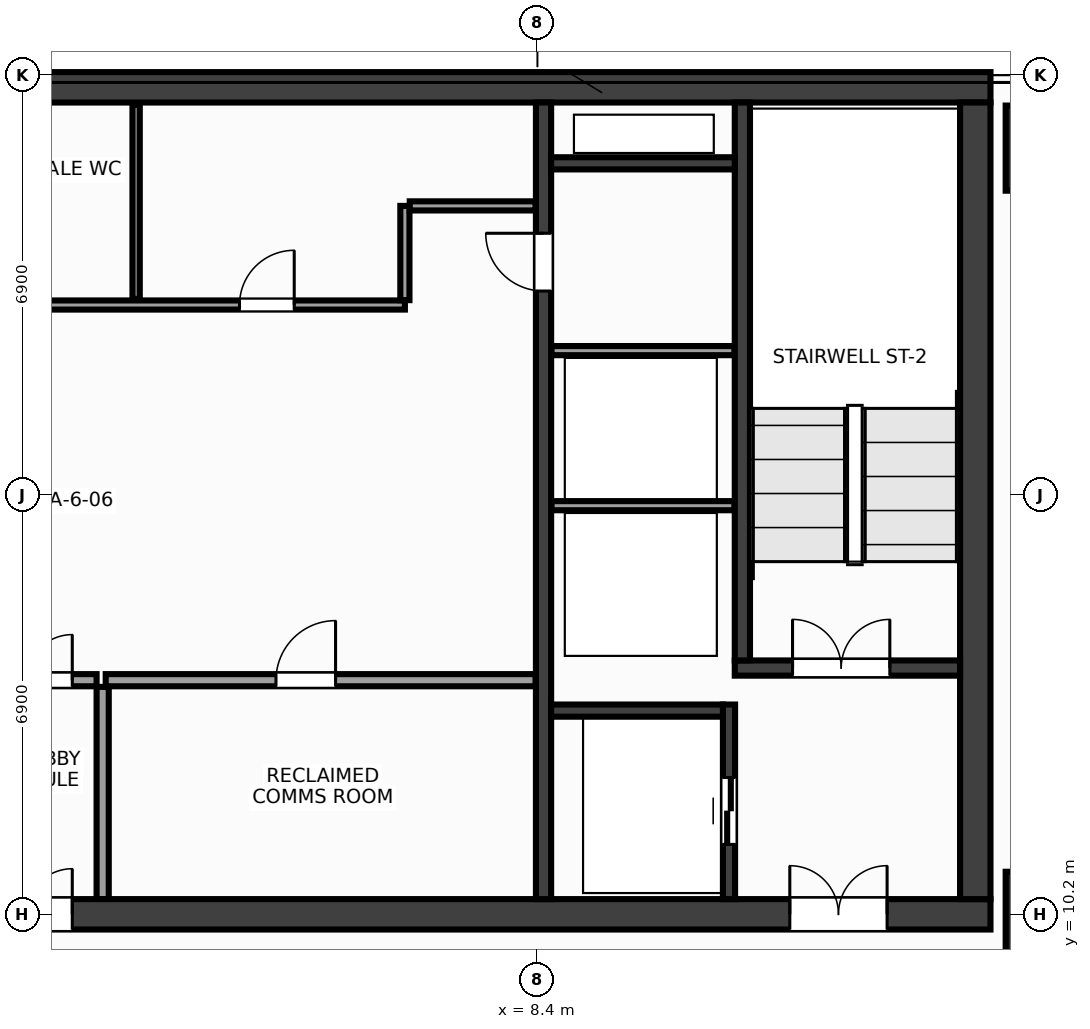
"""IFC4 building model, lengths in metres.
Left out: names, types, materials, properties, quantities, classifications, styles, units other than length and angle.
Written with IfcOpenShell. Run it as: python <this file> out.ifc"""

import sys

from ifc_helpers import new_model, si_unit, direction, frame, frame_2d, origin, origin_2d, place, context, subcontext, project, spatial, rectangle, extrude, source, transform, mapped, element, fill, save


model = new_model("IFC4")
c1 = context("Model", 3, precision=1e-05, world=origin(), true_north=direction((0.0, 1.0)))
c2 = subcontext(c1, "Body", "Model", "MODEL_VIEW")
j1 = project(units=[si_unit("LENGTHUNIT", "METRE"), si_unit("PLANEANGLEUNIT", "RADIAN")], contexts=[c1])
p1 = place(None, origin())
s1 = spatial("IfcSite", under=j1, at=p1, CompositionType="ELEMENT")
p2 = place(p1, origin())
s2 = spatial("IfcBuilding", under=s1, at=p2, CompositionType="ELEMENT")
p3 = place(p2, frame((0.0, 0.0, 207.2)))
s3 = spatial("IfcBuildingStorey", under=s2, at=p3, CompositionType="ELEMENT", Elevation=207.2)
m1 = source(origin(), c2, "Body", "SweptSolid", [
    extrude(rectangle(XDim=31.7, YDim=0.5, at=frame_2d((15.85, 0.0))), origin(), (0.0, 0.0, 1.0), 3.6),
])
p4 = place(p3, frame((-15.85, 23.8, 0.0), z_axis=(0.0, 0.0, 1.0), x_axis=(1.0, 0.0, 0.0)))
e1 = element("IfcWall", 1, at=p4, inside=s3, PredefinedType="SHEAR", context=c2, shape_type="MappedRepresentation", body=[
    mapped(m1, transform((0.0, 0.0, 0.0), x_axis=(1.0, 0.0, 0.0), y_axis=(0.0, 1.0, 0.0), z_axis=(0.0, 0.0, 1.0), scale=1.0)),
])
p5 = place(p3, frame((-15.85, 10.2, 0.0), z_axis=(0.0, 0.0, 1.0), x_axis=(1.0, 0.0, 0.0)))
e2 = element("IfcWall", 2, at=p5, inside=s3, PredefinedType="SHEAR", context=c2, shape_type="MappedRepresentation", body=[
    mapped(m1, transform((0.0, 0.0, 0.0), x_axis=(1.0, 0.0, 0.0), y_axis=(0.0, 1.0, 0.0), z_axis=(0.0, 0.0, 1.0), scale=1.0)),
])
p6 = place(p5, frame((1.7, 0.0, 0.0)))
e3 = element("IfcOpeningElement", 3, at=p6, cuts=e2, PredefinedType="OPENING", context=c2, shape_type="SweptSolid", body=[
    extrude(rectangle(XDim=1.6, YDim=2.15, at=frame_2d((0.8, 1.075))), frame((0.0, 0.262, 0.0), z_axis=(0.0, -1.0, 0.0), x_axis=(1.0, 0.0, 0.0)), (0.0, 0.0, 1.0), 0.524),
])
p7 = place(p5, frame((28.4, 0.0, 0.0)))
e4 = element("IfcOpeningElement", 4, at=p7, cuts=e2, PredefinedType="OPENING", context=c2, shape_type="SweptSolid", body=[
    extrude(rectangle(XDim=1.6, YDim=2.15, at=frame_2d((0.8, 1.075))), frame((0.0, 0.262, 0.0), z_axis=(0.0, -1.0, 0.0), x_axis=(1.0, 0.0, 0.0)), (0.0, 0.0, 1.0), 0.524),
])
p8 = place(p5, frame((15.1, 0.0, 0.0)))
e5 = element("IfcOpeningElement", 5, at=p8, cuts=e2, PredefinedType="OPENING", context=c2, shape_type="SweptSolid", body=[
    extrude(rectangle(XDim=1.5, YDim=2.2, at=frame_2d((0.75, 1.1))), frame((0.0, 0.262, 0.0), z_axis=(0.0, -1.0, 0.0), x_axis=(1.0, 0.0, 0.0)), (0.0, 0.0, 1.0), 0.524),
])
m2 = source(origin(), c2, "Body", "SweptSolid", [
    extrude(rectangle(XDim=13.1, YDim=0.5, at=frame_2d((6.55, 0.0))), origin(), (0.0, 0.0, 1.0), 3.6),
])
p9 = place(p3, frame((15.6, 10.45, 0.0), z_axis=(0.0, 0.0, 1.0), x_axis=(0.0, 1.0, 0.0)))
e6 = element("IfcWall", 6, at=p9, inside=s3, PredefinedType="SHEAR", context=c2, shape_type="MappedRepresentation", body=[
    mapped(m2, transform((0.0, 0.0, 0.0), x_axis=(1.0, 0.0, 0.0), y_axis=(0.0, 1.0, 0.0), z_axis=(0.0, 0.0, 1.0), scale=1.0)),
])
m3 = source(origin(), c2, "Body", "SweptSolid", [
    extrude(rectangle(XDim=13.1, YDim=0.25, at=frame_2d((6.55, 0.0))), origin(), (0.0, 0.0, 1.0), 3.6),
])
p10 = place(p3, frame((8.5, 10.45, 0.0), z_axis=(0.0, 0.0, 1.0), x_axis=(0.0, 1.0, 0.0)))
e7 = element("IfcWall", 7, at=p10, inside=s3, PredefinedType="SHEAR", context=c2, shape_type="MappedRepresentation", body=[
    mapped(m3, transform((0.0, 0.0, 0.0), x_axis=(1.0, 0.0, 0.0), y_axis=(0.0, 1.0, 0.0), z_axis=(0.0, 0.0, 1.0), scale=1.0)),
])
p11 = place(p10, frame((10.0, 0.0, 0.0)))
e8 = element("IfcOpeningElement", 8, at=p11, cuts=e7, PredefinedType="OPENING", context=c2, shape_type="SweptSolid", body=[
    extrude(rectangle(XDim=0.95, YDim=2.15, at=frame_2d((0.475, 1.075))), frame((0.0, 0.137, 0.0), z_axis=(0.0, -1.0, 0.0), x_axis=(1.0, 0.0, 0.0)), (0.0, 0.0, 1.0), 0.274),
])
m4 = source(origin(), c2, "Body", "SweptSolid", [
    extrude(rectangle(XDim=3.705, YDim=0.25, at=frame_2d((1.853, 0.0))), origin(), (0.0, 0.0, 1.0), 3.6),
])
p12 = place(p3, frame((11.645, 14.25, 0.0), z_axis=(0.0, 0.0, 1.0), x_axis=(1.0, 0.0, 0.0)))
e9 = element("IfcWall", 9, at=p12, inside=s3, PredefinedType="SHEAR", context=c2, shape_type="MappedRepresentation", body=[
    mapped(m4, transform((0.0, 0.0, 0.0), x_axis=(1.0, 0.0, 0.0), y_axis=(0.0, 1.0, 0.0), z_axis=(0.0, 0.0, 1.0), scale=1.0)),
])
p13 = place(p12, frame((0.95, 0.0, 0.0)))
e10 = element("IfcOpeningElement", 10, at=p13, cuts=e9, PredefinedType="OPENING", context=c2, shape_type="SweptSolid", body=[
    extrude(rectangle(XDim=1.6, YDim=2.15, at=frame_2d((0.8, 1.075))), frame((0.0, 0.137, 0.0), z_axis=(0.0, -1.0, 0.0), x_axis=(1.0, 0.0, 0.0)), (0.0, 0.0, 1.0), 0.274),
])
m5 = source(origin(), c2, "Body", "SweptSolid", [
    extrude(rectangle(XDim=9.175, YDim=0.25, at=frame_2d((4.587, 0.0))), origin(), (0.0, 0.0, 1.0), 3.6),
])
p14 = place(p3, frame((11.77, 14.375, 0.0), z_axis=(0.0, 0.0, 1.0), x_axis=(0.0, 1.0, 0.0)))
e11 = element("IfcWall", 11, at=p14, inside=s3, PredefinedType="SHEAR", context=c2, shape_type="MappedRepresentation", body=[
    mapped(m5, transform((0.0, 0.0, 0.0), x_axis=(1.0, 0.0, 0.0), y_axis=(0.0, 1.0, 0.0), z_axis=(0.0, 0.0, 1.0), scale=1.0)),
])
m6 = source(origin(), c2, "Body", "SweptSolid", [
    extrude(rectangle(XDim=3.2, YDim=0.2, at=frame_2d((1.6, 0.0))), origin(), (0.0, 0.0, 1.0), 3.6),
])
p15 = place(p3, frame((11.55, 10.45, 0.0), z_axis=(0.0, 0.0, 1.0), x_axis=(0.0, 1.0, 0.0)))
e12 = element("IfcWall", 12, at=p15, inside=s3, PredefinedType="SHEAR", context=c2, shape_type="MappedRepresentation", body=[
    mapped(m6, transform((0.0, 0.0, 0.0), x_axis=(1.0, 0.0, 0.0), y_axis=(0.0, 1.0, 0.0), z_axis=(0.0, 0.0, 1.0), scale=1.0)),
])
p16 = place(p15, frame((0.9, 0.0, 0.0)))
e13 = element("IfcOpeningElement", 13, at=p16, cuts=e12, PredefinedType="OPENING", context=c2, shape_type="SweptSolid", body=[
    extrude(rectangle(XDim=1.1, YDim=2.15, at=frame_2d((0.55, 1.075))), frame((0.0, 0.112, 0.0), z_axis=(0.0, -1.0, 0.0), x_axis=(1.0, 0.0, 0.0)), (0.0, 0.0, 1.0), 0.224),
])
m7 = source(origin(), c2, "Body", "SweptSolid", [
    extrude(rectangle(XDim=2.825, YDim=0.2, at=frame_2d((1.413, 0.0))), origin(), (0.0, 0.0, 1.0), 3.6),
])
p17 = place(p3, frame((8.625, 13.55, 0.0), z_axis=(0.0, 0.0, 1.0), x_axis=(1.0, 0.0, 0.0)))
e14 = element("IfcWall", 14, at=p17, inside=s3, PredefinedType="SHEAR", context=c2, shape_type="MappedRepresentation", body=[
    mapped(m7, transform((0.0, 0.0, 0.0), x_axis=(1.0, 0.0, 0.0), y_axis=(0.0, 1.0, 0.0), z_axis=(0.0, 0.0, 1.0), scale=1.0)),
])
m8 = source(origin(), c2, "Body", "SweptSolid", [
    extrude(rectangle(XDim=3.02, YDim=0.2, at=frame_2d((1.51, 0.0))), origin(), (0.0, 0.0, 1.0), 3.6),
])
p18 = place(p3, frame((8.625, 22.55, 0.0), z_axis=(0.0, 0.0, 1.0), x_axis=(1.0, 0.0, 0.0)))
e15 = element("IfcWall", 15, at=p18, inside=s3, PredefinedType="SHEAR", context=c2, shape_type="MappedRepresentation", body=[
    mapped(m8, transform((0.0, 0.0, 0.0), x_axis=(1.0, 0.0, 0.0), y_axis=(0.0, 1.0, 0.0), z_axis=(0.0, 0.0, 1.0), scale=1.0)),
])
m9 = source(origin(), c2, "Body", "SweptSolid", [
    extrude(rectangle(XDim=1.4, YDim=1.4, at=origin_2d()), origin(), (0.0, 0.0, 1.0), 3.6),
])
for number, where, z_axis, x_axis in (
    (16, (16.8, 10.2, 0.0), (0.0, 0.0, 1.0), (1.0, 0.0, 0.0)),
    (17, (16.8, 22.8, 0.0), (0.0, 0.0, 1.0), (1.0, 0.0, 0.0)),
):
    element("IfcColumn", number, at=place(p3, frame(where, z_axis=z_axis, x_axis=x_axis)), inside=s3, PredefinedType="COLUMN", context=c2, shape_type="MappedRepresentation", body=[
        mapped(m9, transform((0.0, 0.0, 0.0), x_axis=(1.0, 0.0, 0.0), y_axis=(0.0, 1.0, 0.0), z_axis=(0.0, 0.0, 1.0), scale=1.0)),
    ])
m10 = source(origin(), c2, "Body", "SweptSolid", [
    extrude(rectangle(XDim=3.01, YDim=0.15, at=frame_2d((1.505, 0.0))), origin(), (0.0, 0.0, 1.0), 3.38),
])
for number, where, z_axis, x_axis in (
    (18, (8.63, 16.92, 0.0), (0.0, 0.0, 1.0), (1.0, 0.0, 0.0)),
    (19, (8.63, 19.47, 0.0), (0.0, 0.0, 1.0), (1.0, 0.0, 0.0)),
):
    element("IfcWall", number, at=place(p3, frame(where, z_axis=z_axis, x_axis=x_axis)), inside=s3, PredefinedType="PARTITIONING", context=c2, shape_type="MappedRepresentation", body=[
        mapped(m10, transform((0.0, 0.0, 0.0), x_axis=(1.0, 0.0, 0.0), y_axis=(0.0, 1.0, 0.0), z_axis=(0.0, 0.0, 1.0), scale=1.0)),
    ])
m11 = source(origin(), c2, "Body", "SweptSolid", [
    extrude(rectangle(XDim=7.07, YDim=0.2, at=frame_2d((3.535, 0.0))), origin(), (0.0, 0.0, 1.0), 3.38),
])
p19 = place(p3, frame((1.3, 14.05, 0.0), z_axis=(0.0, 0.0, 1.0), x_axis=(1.0, 0.0, 0.0)))
e20 = element("IfcWall", 20, at=p19, inside=s3, PredefinedType="PARTITIONING", context=c2, shape_type="MappedRepresentation", body=[
    mapped(m11, transform((0.0, 0.0, 0.0), x_axis=(1.0, 0.0, 0.0), y_axis=(0.0, 1.0, 0.0), z_axis=(0.0, 0.0, 1.0), scale=1.0)),
])
p20 = place(p19, frame((2.8, 0.0, 0.0)))
e21 = element("IfcOpeningElement", 21, at=p20, cuts=e20, PredefinedType="OPENING", context=c2, shape_type="SweptSolid", body=[
    extrude(rectangle(XDim=0.98, YDim=2.15, at=frame_2d((0.49, 1.075))), frame((0.0, 0.112, 0.0), z_axis=(0.0, -1.0, 0.0), x_axis=(1.0, 0.0, 0.0)), (0.0, 0.0, 1.0), 0.224),
])
m12 = source(origin(), c2, "Body", "SweptSolid", [
    extrude(rectangle(XDim=3.49, YDim=0.2, at=frame_2d((1.745, 0.0))), origin(), (0.0, 0.0, 1.0), 3.38),
])
p21 = place(p3, frame((1.25, 10.45, 0.0), z_axis=(0.0, 0.0, 1.0), x_axis=(0.0, 1.0, 0.0)))
e22 = element("IfcWall", 22, at=p21, inside=s3, PredefinedType="PARTITIONING", context=c2, shape_type="MappedRepresentation", body=[
    mapped(m12, transform((0.0, 0.0, 0.0), x_axis=(1.0, 0.0, 0.0), y_axis=(0.0, 1.0, 0.0), z_axis=(0.0, 0.0, 1.0), scale=1.0)),
])
m13 = source(origin(), c2, "Body", "SweptSolid", [
    extrude(rectangle(XDim=2.3, YDim=0.2, at=frame_2d((1.15, 0.0))), origin(), (0.0, 0.0, 1.0), 3.38),
])
p22 = place(p3, frame((-1.15, 14.05, 0.0), z_axis=(0.0, 0.0, 1.0), x_axis=(1.0, 0.0, 0.0)))
e23 = element("IfcWall", 23, at=p22, inside=s3, PredefinedType="PARTITIONING", context=c2, shape_type="MappedRepresentation", body=[
    mapped(m13, transform((0.0, 0.0, 0.0), x_axis=(1.0, 0.0, 0.0), y_axis=(0.0, 1.0, 0.0), z_axis=(0.0, 0.0, 1.0), scale=1.0)),
])
p23 = place(p22, frame((0.4, 0.0, 0.0)))
e24 = element("IfcOpeningElement", 24, at=p23, cuts=e23, PredefinedType="OPENING", context=c2, shape_type="SweptSolid", body=[
    extrude(rectangle(XDim=1.5, YDim=2.2, at=frame_2d((0.75, 1.1))), frame((0.0, 0.112, 0.0), z_axis=(0.0, -1.0, 0.0), x_axis=(1.0, 0.0, 0.0)), (0.0, 0.0, 1.0), 0.224),
])
m14 = source(origin(), c2, "Body", "SweptSolid", [
    extrude(rectangle(XDim=14.59, YDim=0.15, at=frame_2d((7.295, 0.0))), origin(), (0.0, 0.0, 1.0), 3.38),
])
p24 = place(p3, frame((-8.37, 20.22, 0.0), z_axis=(0.0, 0.0, 1.0), x_axis=(1.0, 0.0, 0.0)))
e25 = element("IfcWall", 25, at=p24, inside=s3, PredefinedType="PARTITIONING", context=c2, shape_type="MappedRepresentation", body=[
    mapped(m14, transform((0.0, 0.0, 0.0), x_axis=(1.0, 0.0, 0.0), y_axis=(0.0, 1.0, 0.0), z_axis=(0.0, 0.0, 1.0), scale=1.0)),
])
p25 = place(p24, frame((1.06, 0.0, 0.0)))
e26 = element("IfcOpeningElement", 26, at=p25, cuts=e25, PredefinedType="OPENING", context=c2, shape_type="SweptSolid", body=[
    extrude(rectangle(XDim=0.9, YDim=2.15, at=frame_2d((0.45, 1.075))), frame((0.0, 0.087, 0.0), z_axis=(0.0, -1.0, 0.0), x_axis=(1.0, 0.0, 0.0)), (0.0, 0.0, 1.0), 0.174),
])
p26 = place(p24, frame((4.22, 0.0, 0.0)))
e27 = element("IfcOpeningElement", 27, at=p26, cuts=e25, PredefinedType="OPENING", context=c2, shape_type="SweptSolid", body=[
    extrude(rectangle(XDim=0.9, YDim=2.15, at=frame_2d((0.45, 1.075))), frame((0.0, 0.087, 0.0), z_axis=(0.0, -1.0, 0.0), x_axis=(1.0, 0.0, 0.0)), (0.0, 0.0, 1.0), 0.174),
])
p27 = place(p24, frame((7.82, 0.0, 0.0)))
e28 = element("IfcOpeningElement", 28, at=p27, cuts=e25, PredefinedType="OPENING", context=c2, shape_type="SweptSolid", body=[
    extrude(rectangle(XDim=0.9, YDim=2.15, at=frame_2d((0.45, 1.075))), frame((0.0, 0.087, 0.0), z_axis=(0.0, -1.0, 0.0), x_axis=(1.0, 0.0, 0.0)), (0.0, 0.0, 1.0), 0.174),
])
p28 = place(p24, frame((11.87, 0.0, 0.0)))
e29 = element("IfcOpeningElement", 29, at=p28, cuts=e25, PredefinedType="OPENING", context=c2, shape_type="SweptSolid", body=[
    extrude(rectangle(XDim=0.9, YDim=2.15, at=frame_2d((0.45, 1.075))), frame((0.0, 0.087, 0.0), z_axis=(0.0, -1.0, 0.0), x_axis=(1.0, 0.0, 0.0)), (0.0, 0.0, 1.0), 0.174),
])
m15 = source(origin(), c2, "Body", "SweptSolid", [
    extrude(rectangle(XDim=1.55, YDim=0.15, at=frame_2d((0.775, 0.0))), origin(), (0.0, 0.0, 1.0), 3.38),
])
p29 = place(p3, frame((6.22, 20.3, 0.0), z_axis=(0.0, 0.0, 1.0), x_axis=(0.0, 1.0, 0.0)))
e30 = element("IfcWall", 30, at=p29, inside=s3, PredefinedType="PARTITIONING", context=c2, shape_type="MappedRepresentation", body=[
    mapped(m15, transform((0.0, 0.0, 0.0), x_axis=(1.0, 0.0, 0.0), y_axis=(0.0, 1.0, 0.0), z_axis=(0.0, 0.0, 1.0), scale=1.0)),
])
m16 = source(origin(), c2, "Body", "SweptSolid", [
    extrude(rectangle(XDim=2.07, YDim=0.15, at=frame_2d((1.035, 0.0))), origin(), (0.0, 0.0, 1.0), 3.38),
])
p30 = place(p3, frame((6.3, 21.85, 0.0), z_axis=(0.0, 0.0, 1.0), x_axis=(1.0, 0.0, 0.0)))
e31 = element("IfcWall", 31, at=p30, inside=s3, PredefinedType="PARTITIONING", context=c2, shape_type="MappedRepresentation", body=[
    mapped(m16, transform((0.0, 0.0, 0.0), x_axis=(1.0, 0.0, 0.0), y_axis=(0.0, 1.0, 0.0), z_axis=(0.0, 0.0, 1.0), scale=1.0)),
])
m17 = source(origin(), c2, "Body", "SweptSolid", [
    extrude(rectangle(XDim=3.19, YDim=0.12, at=frame_2d((1.595, 0.0))), origin(), (0.0, 0.0, 1.0), 3.38),
])
p31 = place(p3, frame((1.8, 20.32, 0.0), z_axis=(0.0, 0.0, 1.0), x_axis=(0.0, 1.0, 0.0)))
e32 = element("IfcWall", 32, at=p31, inside=s3, PredefinedType="PARTITIONING", context=c2, shape_type="MappedRepresentation", body=[
    mapped(m17, transform((0.0, 0.0, 0.0), x_axis=(1.0, 0.0, 0.0), y_axis=(0.0, 1.0, 0.0), z_axis=(0.0, 0.0, 1.0), scale=1.0)),
])
m18 = source(origin(), c2, "Body", "SweptSolid", [
    extrude(rectangle(XDim=1.6, YDim=2.15, at=frame_2d((0.8, 1.075))), frame((0.0, 0.025, 0.0), z_axis=(0.0, -1.0, 0.0), x_axis=(1.0, 0.0, 0.0)), (0.0, 0.0, 1.0), 0.05),
])
p32 = place(p13, origin())
e33 = element("IfcDoor", 33, at=p32, inside=s3, OperationType="DOUBLE_DOOR_SINGLE_SWING", PredefinedType="DOOR", context=c2, shape_type="MappedRepresentation", body=[
    mapped(m18, transform((0.0, 0.0, 0.0), x_axis=(1.0, 0.0, 0.0), y_axis=(0.0, 1.0, 0.0), z_axis=(0.0, 0.0, 1.0), scale=1.0)),
])
fill(e10, e33)
p33 = place(p7, origin())
e34 = element("IfcDoor", 34, at=p33, inside=s3, OperationType="DOUBLE_DOOR_SINGLE_SWING", PredefinedType="DOOR", context=c2, shape_type="MappedRepresentation", body=[
    mapped(m18, transform((0.0, 0.0, 0.0), x_axis=(1.0, 0.0, 0.0), y_axis=(0.0, 1.0, 0.0), z_axis=(0.0, 0.0, 1.0), scale=1.0)),
])
fill(e4, e34)
m19 = source(origin(), c2, "Body", "SweptSolid", [
    extrude(rectangle(XDim=1.1, YDim=2.15, at=frame_2d((0.55, 1.075))), frame((0.0, 0.025, 0.0), z_axis=(0.0, -1.0, 0.0), x_axis=(1.0, 0.0, 0.0)), (0.0, 0.0, 1.0), 0.05),
])
p34 = place(p16, origin())
e35 = element("IfcDoor", 35, at=p34, inside=s3, OperationType="DOUBLE_DOOR_SLIDING", PredefinedType="DOOR", context=c2, shape_type="MappedRepresentation", body=[
    mapped(m19, transform((0.0, 0.0, 0.0), x_axis=(1.0, 0.0, 0.0), y_axis=(0.0, 1.0, 0.0), z_axis=(0.0, 0.0, 1.0), scale=1.0)),
])
fill(e13, e35)
m20 = source(origin(), c2, "Body", "SweptSolid", [
    extrude(rectangle(XDim=0.95, YDim=2.15, at=frame_2d((0.475, 1.075))), frame((0.0, 0.025, 0.0), z_axis=(0.0, -1.0, 0.0), x_axis=(1.0, 0.0, 0.0)), (0.0, 0.0, 1.0), 0.05),
])
p35 = place(p11, origin())
e36 = element("IfcDoor", 36, at=p35, inside=s3, OperationType="SINGLE_SWING_RIGHT", PredefinedType="DOOR", context=c2, shape_type="MappedRepresentation", body=[
    mapped(m20, transform((0.0, 0.0, 0.0), x_axis=(1.0, 0.0, 0.0), y_axis=(0.0, 1.0, 0.0), z_axis=(0.0, 0.0, 1.0), scale=1.0)),
])
fill(e8, e36)
m21 = source(origin(), c2, "Body", "SweptSolid", [
    extrude(rectangle(XDim=0.98, YDim=2.15, at=frame_2d((0.49, 1.075))), frame((0.0, 0.025, 0.0), z_axis=(0.0, -1.0, 0.0), x_axis=(1.0, 0.0, 0.0)), (0.0, 0.0, 1.0), 0.05),
])
p36 = place(p20, origin())
e37 = element("IfcDoor", 37, at=p36, inside=s3, OperationType="SINGLE_SWING_RIGHT", PredefinedType="DOOR", context=c2, shape_type="MappedRepresentation", body=[
    mapped(m21, transform((0.0, 0.0, 0.0), x_axis=(1.0, 0.0, 0.0), y_axis=(0.0, 1.0, 0.0), z_axis=(0.0, 0.0, 1.0), scale=1.0)),
])
fill(e21, e37)
m22 = source(origin(), c2, "Body", "SweptSolid", [
    extrude(rectangle(XDim=1.5, YDim=2.2, at=frame_2d((0.75, 1.1))), frame((0.0, 0.025, 0.0), z_axis=(0.0, -1.0, 0.0), x_axis=(1.0, 0.0, 0.0)), (0.0, 0.0, 1.0), 0.05),
])
p37 = place(p23, origin())
e38 = element("IfcDoor", 38, at=p37, inside=s3, OperationType="DOUBLE_DOOR_SINGLE_SWING", PredefinedType="DOOR", context=c2, shape_type="MappedRepresentation", body=[
    mapped(m22, transform((0.0, 0.0, 0.0), x_axis=(1.0, 0.0, 0.0), y_axis=(0.0, 1.0, 0.0), z_axis=(0.0, 0.0, 1.0), scale=1.0)),
])
fill(e24, e38)
p38 = place(p8, origin())
e39 = element("IfcDoor", 39, at=p38, inside=s3, OperationType="DOUBLE_DOOR_SINGLE_SWING", PredefinedType="DOOR", context=c2, shape_type="MappedRepresentation", body=[
    mapped(m22, transform((0.0, 0.0, 0.0), x_axis=(1.0, 0.0, 0.0), y_axis=(0.0, 1.0, 0.0), z_axis=(0.0, 0.0, 1.0), scale=1.0)),
])
fill(e5, e39)
m23 = source(origin(), c2, "Body", "SweptSolid", [
    extrude(rectangle(XDim=0.9, YDim=2.15, at=frame_2d((0.45, 1.075))), frame((0.0, 0.025, 0.0), z_axis=(0.0, -1.0, 0.0), x_axis=(1.0, 0.0, 0.0)), (0.0, 0.0, 1.0), 0.05),
])
p39 = place(p28, origin())
e40 = element("IfcDoor", 40, at=p39, inside=s3, OperationType="SINGLE_SWING_RIGHT", PredefinedType="DOOR", context=c2, shape_type="MappedRepresentation", body=[
    mapped(m23, transform((0.0, 0.0, 0.0), x_axis=(1.0, 0.0, 0.0), y_axis=(0.0, 1.0, 0.0), z_axis=(0.0, 0.0, 1.0), scale=1.0)),
])
fill(e29, e40)
save(model, sys.argv[1])
